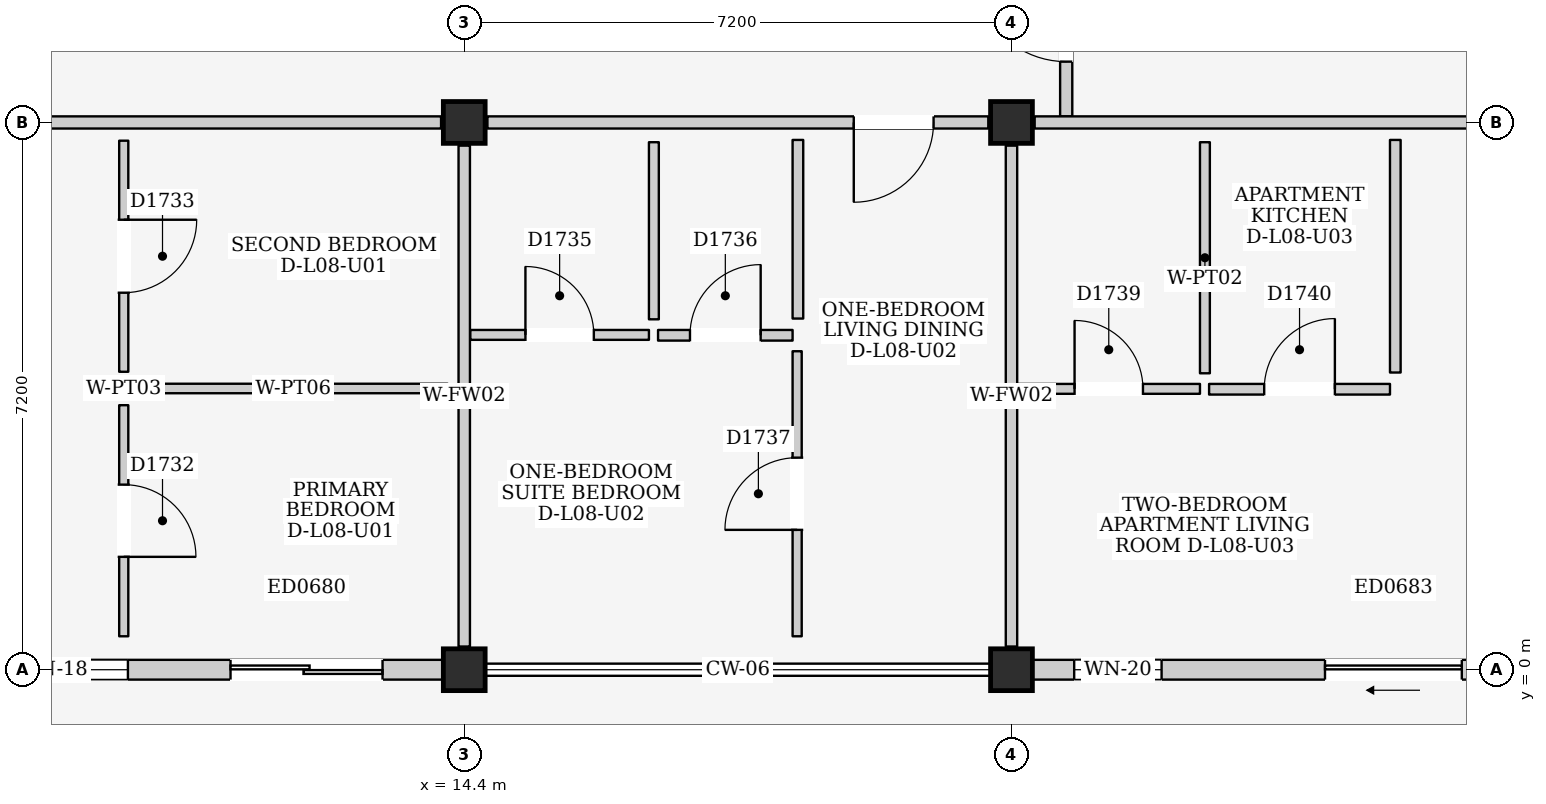
"""IFC4 building model, lengths in metres.
Left out: names, types, materials, properties, quantities, classifications, styles, units other than length and angle.
Written with IfcOpenShell. Run it as: python <this file> out.ifc"""

import sys

from ifc_helpers import new_model, si_unit, direction, frame, frame_2d, origin, origin_2d, place, context, subcontext, project, spatial, rectangle, extrude, element, fill, save


model = new_model("IFC4")
c1 = context("Model", 3, precision=1e-05, world=origin(), true_north=direction((0.0, 1.0)))
c2 = subcontext(c1, "Body", "Model", "MODEL_VIEW")
j1 = project(units=[si_unit("LENGTHUNIT", "METRE"), si_unit("PLANEANGLEUNIT", "RADIAN")], contexts=[c1])
p1 = place(None, origin())
s1 = spatial("IfcSite", under=j1, at=p1, CompositionType="ELEMENT")
p2 = place(p1, origin())
s2 = spatial("IfcBuilding", under=s1, at=p2, CompositionType="ELEMENT")
p3 = place(p2, frame((0.0, 0.0, 28.3)))
s3 = spatial("IfcBuildingStorey", under=s2, at=p3, CompositionType="ELEMENT", Elevation=28.3)
for number, where, z_axis, x_axis in (
    (1, (14.4, 0.0, 0.0), (0.0, 0.0, 1.0), (1.0, 0.0, 0.0)),
    (2, (14.4, 7.2, 0.0), (0.0, 0.0, 1.0), (1.0, 0.0, 0.0)),
    (3, (21.6, 0.0, 0.0), (0.0, 0.0, 1.0), (1.0, 0.0, 0.0)),
    (4, (21.6, 7.2, 0.0), (0.0, 0.0, 1.0), (1.0, 0.0, 0.0)),
):
    element("IfcColumn", number, at=place(p3, frame(where, z_axis=z_axis, x_axis=x_axis)), inside=s3, PredefinedType="COLUMN", context=c2, shape_type="SweptSolid", body=[
        extrude(rectangle(XDim=0.55, YDim=0.55, at=origin_2d()), origin(), (0.0, 0.0, 1.0), 3.2),
    ])
p4 = place(p3, frame((7.475, 0.0, 0.0), z_axis=(0.0, 0.0, 1.0), x_axis=(1.0, 0.0, 0.0)))
e5 = element("IfcWall", 5, at=p4, inside=s3, PredefinedType="ELEMENTEDWALL", context=c2, shape_type="SweptSolid", body=[
    extrude(rectangle(XDim=6.65, YDim=0.26, at=frame_2d((3.325, 0.0))), origin(), (0.0, 0.0, 1.0), 2.495),
])
p5 = place(p4, frame((3.85, 0.0, 0.0)))
e6 = element("IfcOpeningElement", 6, at=p5, cuts=e5, PredefinedType="OPENING", context=c2, shape_type="SweptSolid", body=[
    extrude(rectangle(XDim=2.0, YDim=2.12, at=frame_2d((1.0, 1.06))), frame((0.0, 0.145, 0.0), z_axis=(0.0, -1.0, 0.0), x_axis=(1.0, 0.0, 0.0)), (0.0, 0.0, 1.0), 0.29),
])
p6 = place(p4, frame((0.55, 0.0, 0.83)))
e7 = element("IfcOpeningElement", 7, at=p6, cuts=e5, PredefinedType="OPENING", context=c2, shape_type="SweptSolid", body=[
    extrude(rectangle(XDim=1.95, YDim=1.55, at=frame_2d((0.975, 0.775))), frame((0.0, 0.145, 0.0), z_axis=(0.0, -1.0, 0.0), x_axis=(1.0, 0.0, 0.0)), (0.0, 0.0, 1.0), 0.29),
])
p7 = place(p3, frame((21.875, 0.0, 0.0), z_axis=(0.0, 0.0, 1.0), x_axis=(1.0, 0.0, 0.0)))
e8 = element("IfcWall", 8, at=p7, inside=s3, PredefinedType="ELEMENTEDWALL", context=c2, shape_type="SweptSolid", body=[
    extrude(rectangle(XDim=6.65, YDim=0.26, at=frame_2d((3.325, 0.0))), origin(), (0.0, 0.0, 1.0), 2.495),
])
p8 = place(p7, frame((3.85, 0.0, 0.0)))
e9 = element("IfcOpeningElement", 9, at=p8, cuts=e8, PredefinedType="OPENING", context=c2, shape_type="SweptSolid", body=[
    extrude(rectangle(XDim=1.8, YDim=2.12, at=frame_2d((0.9, 1.06))), frame((0.0, 0.145, 0.0), z_axis=(0.0, -1.0, 0.0), x_axis=(1.0, 0.0, 0.0)), (0.0, 0.0, 1.0), 0.29),
])
p9 = place(p7, frame((0.55, 0.0, 0.9)))
e10 = element("IfcOpeningElement", 10, at=p9, cuts=e8, PredefinedType="OPENING", context=c2, shape_type="SweptSolid", body=[
    extrude(rectangle(XDim=1.15, YDim=1.15, at=frame_2d((0.575, 0.575))), frame((0.0, 0.145, 0.0), z_axis=(0.0, -1.0, 0.0), x_axis=(1.0, 0.0, 0.0)), (0.0, 0.0, 1.0), 0.29),
])
p10 = place(p3, frame((22.32, 7.28, 0.0), z_axis=(0.0, 0.0, 1.0), x_axis=(0.0, 1.0, 0.0)))
e11 = element("IfcWall", 11, at=p10, inside=s3, PredefinedType="PARTITIONING", context=c2, shape_type="SweptSolid", body=[
    extrude(rectangle(XDim=4.32, YDim=0.16, at=frame_2d((2.16, 0.0))), origin(), (0.0, 0.0, 1.0), 2.95),
])
p11 = place(p10, frame((0.72, 0.0, 0.0)))
e12 = element("IfcOpeningElement", 12, at=p11, cuts=e11, PredefinedType="OPENING", context=c2, shape_type="SweptSolid", body=[
    extrude(rectangle(XDim=1.2, YDim=2.2, at=frame_2d((0.6, 1.1))), frame((0.0, 0.095, 0.0), z_axis=(0.0, -1.0, 0.0), x_axis=(1.0, 0.0, 0.0)), (0.0, 0.0, 1.0), 0.19),
])
p12 = place(p3, frame((7.505, 7.2, 0.0), z_axis=(0.0, 0.0, 1.0), x_axis=(1.0, 0.0, 0.0)))
e13 = element("IfcWall", 13, at=p12, inside=s3, PredefinedType="PARTITIONING", context=c2, shape_type="SweptSolid", body=[
    extrude(rectangle(XDim=6.59, YDim=0.16, at=frame_2d((3.295, 0.0))), origin(), (0.0, 0.0, 1.0), 2.345),
])
p13 = place(p3, frame((14.4, 0.305, 0.0), z_axis=(0.0, 0.0, 1.0), x_axis=(0.0, 1.0, 0.0)))
e14 = element("IfcWall", 14, at=p13, inside=s3, PredefinedType="PARTITIONING", context=c2, shape_type="SweptSolid", body=[
    extrude(rectangle(XDim=6.59, YDim=0.15, at=frame_2d((3.295, 0.0))), origin(), (0.0, 0.0, 1.0), 2.445),
])
p14 = place(p3, frame((9.92, 0.44, 0.0), z_axis=(0.0, 0.0, 1.0), x_axis=(0.0, 1.0, 0.0)))
e15 = element("IfcWall", 15, at=p14, inside=s3, PredefinedType="PARTITIONING", context=c2, shape_type="SweptSolid", body=[
    extrude(rectangle(XDim=3.04, YDim=0.12, at=frame_2d((1.52, 0.0))), origin(), (0.0, 0.0, 1.0), 2.95),
])
p15 = place(p14, frame((1.045, 0.0, 0.0)))
e16 = element("IfcOpeningElement", 16, at=p15, cuts=e15, PredefinedType="OPENING", context=c2, shape_type="SweptSolid", body=[
    extrude(rectangle(XDim=0.95, YDim=2.15, at=frame_2d((0.475, 1.075))), frame((0.0, 0.075, 0.0), z_axis=(0.0, -1.0, 0.0), x_axis=(1.0, 0.0, 0.0)), (0.0, 0.0, 1.0), 0.15),
])
p16 = place(p3, frame((10.12, 3.7, 0.0), z_axis=(0.0, 0.0, 1.0), x_axis=(1.0, 0.0, 0.0)))
e17 = element("IfcWall", 17, at=p16, inside=s3, PredefinedType="PARTITIONING", context=c2, shape_type="SweptSolid", body=[
    extrude(rectangle(XDim=4.06, YDim=0.125, at=frame_2d((2.03, 0.0))), origin(), (0.0, 0.0, 1.0), 2.95),
])
p17 = place(p3, frame((9.92, 3.92, 0.0), z_axis=(0.0, 0.0, 1.0), x_axis=(0.0, 1.0, 0.0)))
e18 = element("IfcWall", 18, at=p17, inside=s3, PredefinedType="PARTITIONING", context=c2, shape_type="SweptSolid", body=[
    extrude(rectangle(XDim=3.04, YDim=0.12, at=frame_2d((1.52, 0.0))), origin(), (0.0, 0.0, 1.0), 2.95),
])
p18 = place(p17, frame((1.04, 0.0, 0.0)))
e19 = element("IfcOpeningElement", 19, at=p18, cuts=e18, PredefinedType="OPENING", context=c2, shape_type="SweptSolid", body=[
    extrude(rectangle(XDim=0.96, YDim=2.15, at=frame_2d((0.48, 1.075))), frame((0.0, 0.075, 0.0), z_axis=(0.0, -1.0, 0.0), x_axis=(1.0, 0.0, 0.0)), (0.0, 0.0, 1.0), 0.15),
])
p19 = place(p3, frame((14.705, 7.2, 0.0), z_axis=(0.0, 0.0, 1.0), x_axis=(1.0, 0.0, 0.0)))
e20 = element("IfcWall", 20, at=p19, inside=s3, PredefinedType="PARTITIONING", context=c2, shape_type="SweptSolid", body=[
    extrude(rectangle(XDim=6.59, YDim=0.16, at=frame_2d((3.295, 0.0))), origin(), (0.0, 0.0, 1.0), 2.345),
])
p20 = place(p19, frame((4.82, 0.0, 0.0)))
e21 = element("IfcOpeningElement", 21, at=p20, cuts=e20, PredefinedType="OPENING", context=c2, shape_type="SweptSolid", body=[
    extrude(rectangle(XDim=1.05, YDim=2.15, at=frame_2d((0.525, 1.075))), frame((0.0, 0.095, 0.0), z_axis=(0.0, -1.0, 0.0), x_axis=(1.0, 0.0, 0.0)), (0.0, 0.0, 1.0), 0.19),
])
p21 = place(p3, frame((21.6, 0.305, 0.0), z_axis=(0.0, 0.0, 1.0), x_axis=(0.0, 1.0, 0.0)))
e22 = element("IfcWall", 22, at=p21, inside=s3, PredefinedType="PARTITIONING", context=c2, shape_type="SweptSolid", body=[
    extrude(rectangle(XDim=6.59, YDim=0.15, at=frame_2d((3.295, 0.0))), origin(), (0.0, 0.0, 1.0), 2.445),
])
p22 = place(p3, frame((14.48, 4.405, 0.0), z_axis=(0.0, 0.0, 1.0), x_axis=(1.0, 0.0, 0.0)))
e23 = element("IfcWall", 23, at=p22, inside=s3, PredefinedType="PARTITIONING", context=c2, shape_type="SweptSolid", body=[
    extrude(rectangle(XDim=2.35, YDim=0.13, at=frame_2d((1.175, 0.0))), origin(), (0.0, 0.0, 1.0), 2.95),
])
p23 = place(p22, frame((0.725, 0.0, 0.0)))
e24 = element("IfcOpeningElement", 24, at=p23, cuts=e23, PredefinedType="OPENING", context=c2, shape_type="SweptSolid", body=[
    extrude(rectangle(XDim=0.9, YDim=2.1, at=frame_2d((0.45, 1.05))), frame((0.0, 0.08, 0.0), z_axis=(0.0, -1.0, 0.0), x_axis=(1.0, 0.0, 0.0)), (0.0, 0.0, 1.0), 0.16),
])
p24 = place(p3, frame((16.895, 4.61, 0.0), z_axis=(0.0, 0.0, 1.0), x_axis=(0.0, 1.0, 0.0)))
e25 = element("IfcWall", 25, at=p24, inside=s3, PredefinedType="PARTITIONING", context=c2, shape_type="SweptSolid", body=[
    extrude(rectangle(XDim=2.33, YDim=0.13, at=frame_2d((1.165, 0.0))), origin(), (0.0, 0.0, 1.0), 2.95),
])
p25 = place(p3, frame((16.95, 4.4, 0.0), z_axis=(0.0, 0.0, 1.0), x_axis=(1.0, 0.0, 0.0)))
e26 = element("IfcWall", 26, at=p25, inside=s3, PredefinedType="PARTITIONING", context=c2, shape_type="SweptSolid", body=[
    extrude(rectangle(XDim=1.77, YDim=0.14, at=frame_2d((0.885, 0.0))), origin(), (0.0, 0.0, 1.0), 2.95),
])
p26 = place(p25, frame((0.42, 0.0, 0.0)))
e27 = element("IfcOpeningElement", 27, at=p26, cuts=e26, PredefinedType="OPENING", context=c2, shape_type="SweptSolid", body=[
    extrude(rectangle(XDim=0.93, YDim=2.14, at=frame_2d((0.465, 1.07))), frame((0.0, 0.085, 0.0), z_axis=(0.0, -1.0, 0.0), x_axis=(1.0, 0.0, 0.0)), (0.0, 0.0, 1.0), 0.17),
])
p27 = place(p3, frame((18.79, 4.62, 0.0), z_axis=(0.0, 0.0, 1.0), x_axis=(0.0, 1.0, 0.0)))
e28 = element("IfcWall", 28, at=p27, inside=s3, PredefinedType="PARTITIONING", context=c2, shape_type="SweptSolid", body=[
    extrude(rectangle(XDim=2.35, YDim=0.14, at=frame_2d((1.175, 0.0))), origin(), (0.0, 0.0, 1.0), 2.95),
])
p28 = place(p3, frame((18.78, 0.44, 0.0), z_axis=(0.0, 0.0, 1.0), x_axis=(0.0, 1.0, 0.0)))
e29 = element("IfcWall", 29, at=p28, inside=s3, PredefinedType="PARTITIONING", context=c2, shape_type="SweptSolid", body=[
    extrude(rectangle(XDim=3.75, YDim=0.12, at=frame_2d((1.875, 0.0))), origin(), (0.0, 0.0, 1.0), 2.95),
])
p29 = place(p28, frame((1.4, 0.0, 0.0)))
e30 = element("IfcOpeningElement", 30, at=p29, cuts=e29, PredefinedType="OPENING", context=c2, shape_type="SweptSolid", body=[
    extrude(rectangle(XDim=0.95, YDim=2.15, at=frame_2d((0.475, 1.075))), frame((0.0, 0.075, 0.0), z_axis=(0.0, -1.0, 0.0), x_axis=(1.0, 0.0, 0.0)), (0.0, 0.0, 1.0), 0.15),
])
p30 = place(p3, frame((21.905, 7.2, 0.0), z_axis=(0.0, 0.0, 1.0), x_axis=(1.0, 0.0, 0.0)))
e31 = element("IfcWall", 31, at=p30, inside=s3, PredefinedType="PARTITIONING", context=c2, shape_type="SweptSolid", body=[
    extrude(rectangle(XDim=6.59, YDim=0.16, at=frame_2d((3.295, 0.0))), origin(), (0.0, 0.0, 1.0), 2.345),
])
p31 = place(p3, frame((21.68, 3.695, 0.0), z_axis=(0.0, 0.0, 1.0), x_axis=(1.0, 0.0, 0.0)))
e32 = element("IfcWall", 32, at=p31, inside=s3, PredefinedType="PARTITIONING", context=c2, shape_type="SweptSolid", body=[
    extrude(rectangle(XDim=2.4, YDim=0.13, at=frame_2d((1.2, 0.0))), origin(), (0.0, 0.0, 1.0), 2.95),
])
p32 = place(p31, frame((0.75, 0.0, 0.0)))
e33 = element("IfcOpeningElement", 33, at=p32, cuts=e32, PredefinedType="OPENING", context=c2, shape_type="SweptSolid", body=[
    extrude(rectangle(XDim=0.9, YDim=2.1, at=frame_2d((0.45, 1.05))), frame((0.0, 0.08, 0.0), z_axis=(0.0, -1.0, 0.0), x_axis=(1.0, 0.0, 0.0)), (0.0, 0.0, 1.0), 0.16),
])
p33 = place(p3, frame((24.145, 3.9, 0.0), z_axis=(0.0, 0.0, 1.0), x_axis=(0.0, 1.0, 0.0)))
e34 = element("IfcWall", 34, at=p33, inside=s3, PredefinedType="PARTITIONING", context=c2, shape_type="SweptSolid", body=[
    extrude(rectangle(XDim=3.04, YDim=0.13, at=frame_2d((1.52, 0.0))), origin(), (0.0, 0.0, 1.0), 2.95),
])
p34 = place(p3, frame((24.2, 3.69, 0.0), z_axis=(0.0, 0.0, 1.0), x_axis=(1.0, 0.0, 0.0)))
e35 = element("IfcWall", 35, at=p34, inside=s3, PredefinedType="PARTITIONING", context=c2, shape_type="SweptSolid", body=[
    extrude(rectangle(XDim=2.38, YDim=0.14, at=frame_2d((1.19, 0.0))), origin(), (0.0, 0.0, 1.0), 2.95),
])
p35 = place(p34, frame((0.725, 0.0, 0.0)))
e36 = element("IfcOpeningElement", 36, at=p35, cuts=e35, PredefinedType="OPENING", context=c2, shape_type="SweptSolid", body=[
    extrude(rectangle(XDim=0.93, YDim=2.14, at=frame_2d((0.465, 1.07))), frame((0.0, 0.085, 0.0), z_axis=(0.0, -1.0, 0.0), x_axis=(1.0, 0.0, 0.0)), (0.0, 0.0, 1.0), 0.17),
])
p36 = place(p3, frame((26.65, 3.91, 0.0), z_axis=(0.0, 0.0, 1.0), x_axis=(0.0, 1.0, 0.0)))
e37 = element("IfcWall", 37, at=p36, inside=s3, PredefinedType="PARTITIONING", context=c2, shape_type="SweptSolid", body=[
    extrude(rectangle(XDim=3.06, YDim=0.14, at=frame_2d((1.53, 0.0))), origin(), (0.0, 0.0, 1.0), 2.95),
])
p37 = place(p5, frame((2.0, 0.0, 0.0), z_axis=(0.0, 0.0, 1.0), x_axis=(-1.0, 0.0, 0.0)))
e38 = element("IfcDoor", 38, at=p37, inside=s3, OperationType="DOUBLE_DOOR_SLIDING", PredefinedType="DOOR", context=c2, shape_type="SweptSolid", body=[
    extrude(rectangle(XDim=2.0, YDim=2.12, at=frame_2d((1.0, 1.06))), frame((0.0, 0.025, 0.0), z_axis=(0.0, -1.0, 0.0), x_axis=(1.0, 0.0, 0.0)), (0.0, 0.0, 1.0), 0.05),
])
fill(e6, e38)
p38 = place(p6, origin())
e39 = element("IfcWindow", 39, at=p38, inside=s3, PartitioningType="DOUBLE_PANEL_VERTICAL", PredefinedType="WINDOW", context=c2, shape_type="SweptSolid", body=[
    extrude(rectangle(XDim=1.95, YDim=1.55, at=frame_2d((0.975, 0.775))), frame((0.0, 0.03, 0.0), z_axis=(0.0, -1.0, 0.0), x_axis=(1.0, 0.0, 0.0)), (0.0, 0.0, 1.0), 0.06),
])
fill(e7, e39)
p39 = place(p8, frame((1.8, 0.0, 0.0), z_axis=(0.0, 0.0, 1.0), x_axis=(-1.0, 0.0, 0.0)))
e40 = element("IfcDoor", 40, at=p39, inside=s3, OperationType="SLIDING_TO_LEFT", PredefinedType="DOOR", context=c2, shape_type="SweptSolid", body=[
    extrude(rectangle(XDim=1.8, YDim=2.12, at=frame_2d((0.9, 1.06))), frame((0.0, 0.025, 0.0), z_axis=(0.0, -1.0, 0.0), x_axis=(1.0, 0.0, 0.0)), (0.0, 0.0, 1.0), 0.05),
])
fill(e9, e40)
p40 = place(p9, origin())
e41 = element("IfcWindow", 41, at=p40, inside=s3, PartitioningType="SINGLE_PANEL", PredefinedType="WINDOW", context=c2, shape_type="SweptSolid", body=[
    extrude(rectangle(XDim=1.15, YDim=1.15, at=frame_2d((0.575, 0.575))), frame((0.0, 0.03, 0.0), z_axis=(0.0, -1.0, 0.0), x_axis=(1.0, 0.0, 0.0)), (0.0, 0.0, 1.0), 0.06),
])
fill(e10, e41)
p41 = place(p11, origin())
e42 = element("IfcDoor", 42, at=p41, inside=s3, OperationType="SINGLE_SWING_RIGHT", PredefinedType="DOOR", context=c2, shape_type="SweptSolid", body=[
    extrude(rectangle(XDim=1.2, YDim=2.2, at=frame_2d((0.6, 1.1))), frame((0.0, 0.025, 0.0), z_axis=(0.0, -1.0, 0.0), x_axis=(1.0, 0.0, 0.0)), (0.0, 0.0, 1.0), 0.05),
])
fill(e12, e42)
p42 = place(p15, frame((0.95, 0.0, 0.0), z_axis=(0.0, 0.0, 1.0), x_axis=(-1.0, 0.0, 0.0)))
e43 = element("IfcDoor", 43, at=p42, inside=s3, OperationType="SINGLE_SWING_RIGHT", PredefinedType="DOOR", context=c2, shape_type="SweptSolid", body=[
    extrude(rectangle(XDim=0.95, YDim=2.15, at=frame_2d((0.475, 1.075))), frame((0.0, 0.025, 0.0), z_axis=(0.0, -1.0, 0.0), x_axis=(1.0, 0.0, 0.0)), (0.0, 0.0, 1.0), 0.05),
])
fill(e16, e43)
p43 = place(p18, frame((0.96, 0.0, 0.0), z_axis=(0.0, 0.0, 1.0), x_axis=(-1.0, 0.0, 0.0)))
e44 = element("IfcDoor", 44, at=p43, inside=s3, OperationType="SINGLE_SWING_LEFT", PredefinedType="DOOR", context=c2, shape_type="SweptSolid", body=[
    extrude(rectangle(XDim=0.96, YDim=2.15, at=frame_2d((0.48, 1.075))), frame((0.0, 0.025, 0.0), z_axis=(0.0, -1.0, 0.0), x_axis=(1.0, 0.0, 0.0)), (0.0, 0.0, 1.0), 0.05),
])
fill(e19, e44)
p44 = place(p20, frame((1.05, 0.0, 0.0), z_axis=(0.0, 0.0, 1.0), x_axis=(-1.0, 0.0, 0.0)))
e45 = element("IfcDoor", 45, at=p44, inside=s3, OperationType="SINGLE_SWING_RIGHT", PredefinedType="DOOR", context=c2, shape_type="SweptSolid", body=[
    extrude(rectangle(XDim=1.05, YDim=2.15, at=frame_2d((0.525, 1.075))), frame((0.0, 0.025, 0.0), z_axis=(0.0, -1.0, 0.0), x_axis=(1.0, 0.0, 0.0)), (0.0, 0.0, 1.0), 0.05),
])
fill(e21, e45)
p45 = place(p23, origin())
e46 = element("IfcDoor", 46, at=p45, inside=s3, OperationType="SINGLE_SWING_LEFT", PredefinedType="DOOR", context=c2, shape_type="SweptSolid", body=[
    extrude(rectangle(XDim=0.9, YDim=2.1, at=frame_2d((0.45, 1.05))), frame((0.0, 0.025, 0.0), z_axis=(0.0, -1.0, 0.0), x_axis=(1.0, 0.0, 0.0)), (0.0, 0.0, 1.0), 0.05),
])
fill(e24, e46)
p46 = place(p26, origin())
e47 = element("IfcDoor", 47, at=p46, inside=s3, OperationType="SINGLE_SWING_RIGHT", PredefinedType="DOOR", context=c2, shape_type="SweptSolid", body=[
    extrude(rectangle(XDim=0.93, YDim=2.14, at=frame_2d((0.465, 1.07))), frame((0.0, 0.025, 0.0), z_axis=(0.0, -1.0, 0.0), x_axis=(1.0, 0.0, 0.0)), (0.0, 0.0, 1.0), 0.05),
])
fill(e27, e47)
p47 = place(p29, origin())
e48 = element("IfcDoor", 48, at=p47, inside=s3, OperationType="SINGLE_SWING_LEFT", PredefinedType="DOOR", context=c2, shape_type="SweptSolid", body=[
    extrude(rectangle(XDim=0.95, YDim=2.15, at=frame_2d((0.475, 1.075))), frame((0.0, 0.025, 0.0), z_axis=(0.0, -1.0, 0.0), x_axis=(1.0, 0.0, 0.0)), (0.0, 0.0, 1.0), 0.05),
])
fill(e30, e48)
p48 = place(p32, origin())
e49 = element("IfcDoor", 49, at=p48, inside=s3, OperationType="SINGLE_SWING_LEFT", PredefinedType="DOOR", context=c2, shape_type="SweptSolid", body=[
    extrude(rectangle(XDim=0.9, YDim=2.1, at=frame_2d((0.45, 1.05))), frame((0.0, 0.025, 0.0), z_axis=(0.0, -1.0, 0.0), x_axis=(1.0, 0.0, 0.0)), (0.0, 0.0, 1.0), 0.05),
])
fill(e33, e49)
p49 = place(p35, origin())
e50 = element("IfcDoor", 50, at=p49, inside=s3, OperationType="SINGLE_SWING_RIGHT", PredefinedType="DOOR", context=c2, shape_type="SweptSolid", body=[
    extrude(rectangle(XDim=0.93, YDim=2.14, at=frame_2d((0.465, 1.07))), frame((0.0, 0.025, 0.0), z_axis=(0.0, -1.0, 0.0), x_axis=(1.0, 0.0, 0.0)), (0.0, 0.0, 1.0), 0.05),
])
fill(e36, e50)
save(model, sys.argv[1])
